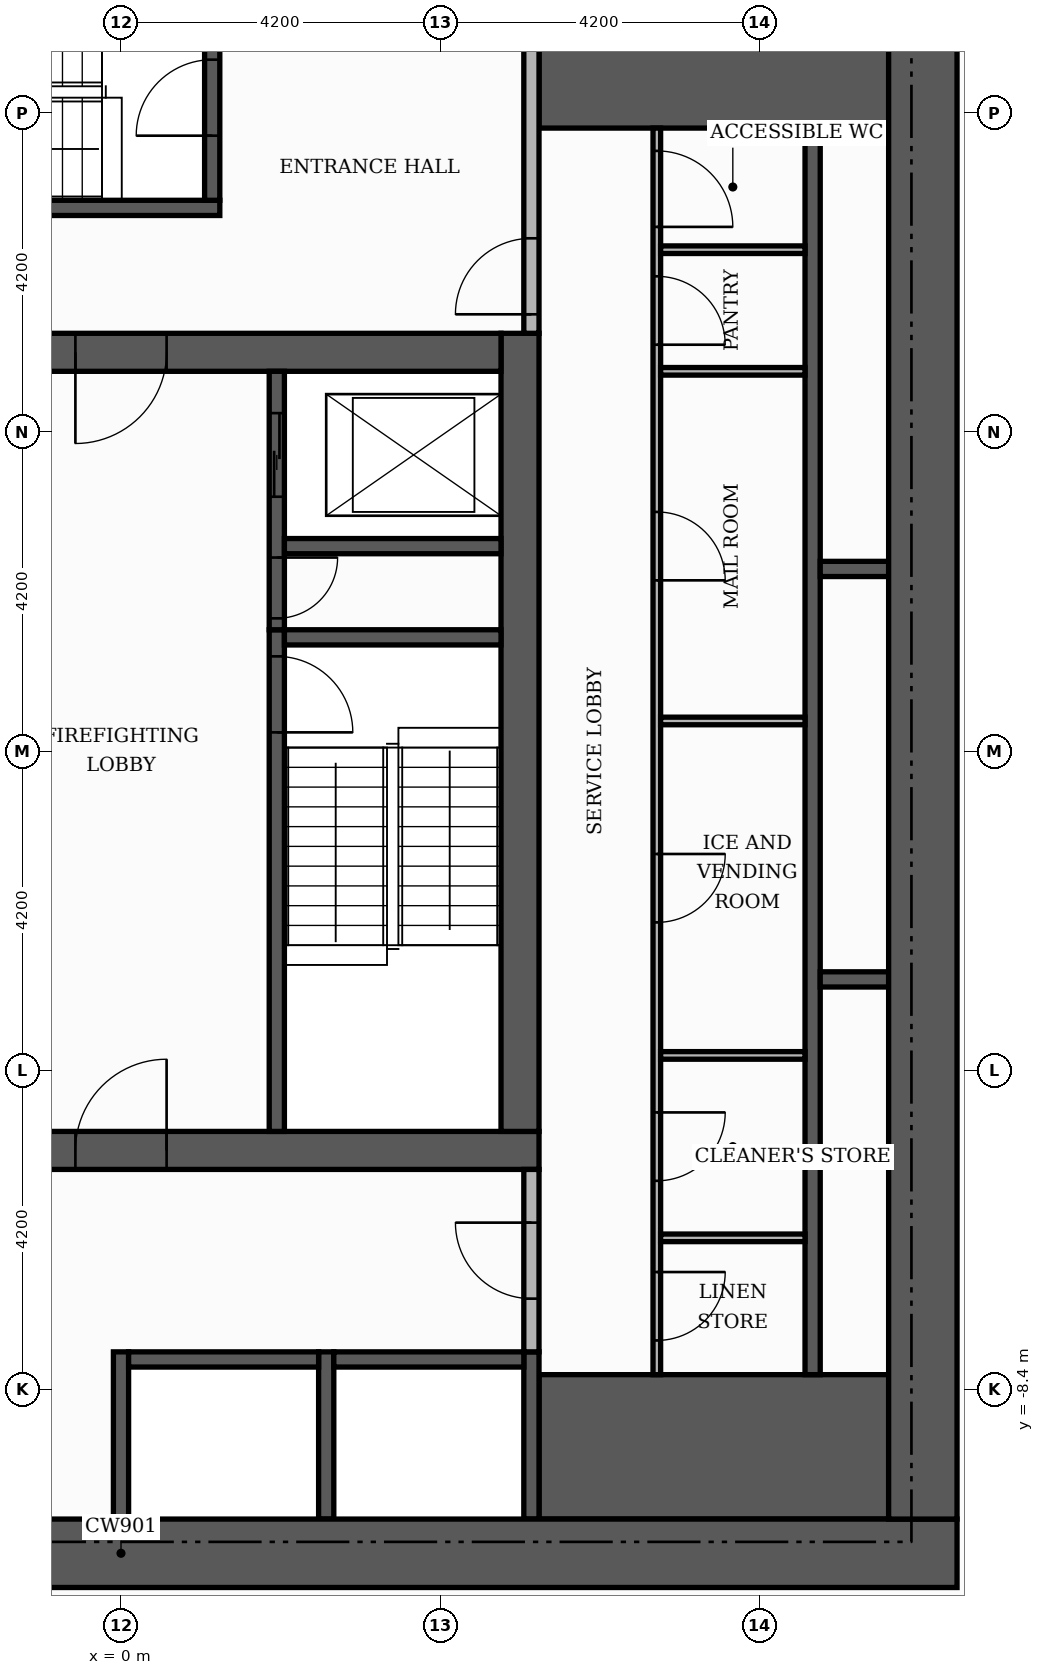
"""IFC4 building model, lengths in metres.
Left out: names, types, materials, properties, quantities, classifications, styles, units other than length and angle.
Written with IfcOpenShell. Run it as: python <this file> out.ifc"""

import sys

from ifc_helpers import new_model, si_unit, direction, frame, frame_2d, origin, place, context, subcontext, project, spatial, rectangle, extrude, element, fill, save


model = new_model("IFC4")
c1 = context("Model", 3, precision=1e-05, world=origin(), true_north=direction((0.0, 1.0)))
c2 = subcontext(c1, "Body", "Model", "MODEL_VIEW")
j1 = project(units=[si_unit("LENGTHUNIT", "METRE"), si_unit("PLANEANGLEUNIT", "RADIAN")], contexts=[c1])
p1 = place(None, origin())
s1 = spatial("IfcSite", under=j1, at=p1, CompositionType="ELEMENT")
p2 = place(p1, origin())
s2 = spatial("IfcBuilding", under=s1, at=p2, CompositionType="ELEMENT")
p3 = place(p2, frame((0.0, 0.0, 54.3)))
s3 = spatial("IfcBuildingStorey", under=s2, at=p3, CompositionType="ELEMENT", Elevation=54.3)
p4 = place(p3, frame((-5.5, -5.25, 0.0), z_axis=(0.0, 0.0, 1.0), x_axis=(1.0, 0.0, 0.0)))
e1 = element("IfcWall", 1, at=p4, inside=s3, PredefinedType="SHEAR", context=c2, shape_type="SweptSolid", body=[
    extrude(rectangle(XDim=11.0, YDim=0.5, at=frame_2d((5.5, 0.0))), origin(), (0.0, 0.0, 1.0), 3.48),
])
p5 = place(p4, frame((4.9, 0.0, 0.0)))
e2 = element("IfcOpeningElement", 2, at=p5, cuts=e1, PredefinedType="OPENING", context=c2, shape_type="SweptSolid", body=[
    extrude(rectangle(XDim=1.2, YDim=2.1, at=frame_2d((0.6, 1.05))), frame((0.0, 0.26, 0.0), z_axis=(0.0, -1.0, 0.0), x_axis=(1.0, 0.0, 0.0)), (0.0, 0.0, 1.0), 0.52),
])
p6 = place(p3, frame((5.25, -5.0, 0.0), z_axis=(0.0, 0.0, 1.0), x_axis=(0.0, 1.0, 0.0)))
e3 = element("IfcWall", 3, at=p6, inside=s3, PredefinedType="SHEAR", context=c2, shape_type="SweptSolid", body=[
    extrude(rectangle(XDim=10.5, YDim=0.5, at=frame_2d((5.25, 0.0))), origin(), (0.0, 0.0, 1.0), 3.48),
])
p7 = place(p3, frame((-5.0, 5.25, 0.0), z_axis=(0.0, 0.0, 1.0), x_axis=(1.0, 0.0, 0.0)))
e4 = element("IfcWall", 4, at=p7, inside=s3, PredefinedType="SHEAR", context=c2, shape_type="SweptSolid", body=[
    extrude(rectangle(XDim=10.0, YDim=0.5, at=frame_2d((5.0, 0.0))), origin(), (0.0, 0.0, 1.0), 3.48),
])
p8 = place(p7, frame((4.4, 0.0, 0.0)))
e5 = element("IfcOpeningElement", 5, at=p8, cuts=e4, PredefinedType="OPENING", context=c2, shape_type="SweptSolid", body=[
    extrude(rectangle(XDim=1.2, YDim=2.1, at=frame_2d((0.6, 1.05))), frame((0.0, 0.26, 0.0), z_axis=(0.0, -1.0, 0.0), x_axis=(1.0, 0.0, 0.0)), (0.0, 0.0, 1.0), 0.52),
])
for number, where, z_axis, x_axis in (
    (6, (5.5, -9.15, 0.0), (0.0, 0.0, 1.0), (1.0, 0.0, 0.0)),
    (7, (5.5, 9.15, 0.0), (0.0, 0.0, 1.0), (1.0, 0.0, 0.0)),
):
    element("IfcWall", number, at=place(p3, frame(where, z_axis=z_axis, x_axis=x_axis)), inside=s3, PredefinedType="SHEAR", context=c2, shape_type="SweptSolid", body=[
        extrude(rectangle(XDim=4.6, YDim=1.9, at=frame_2d((2.3, 0.0))), origin(), (0.0, 0.0, 1.0), 3.48),
    ])
p9 = place(p3, frame((2.05, -5.0, 0.0), z_axis=(0.0, 0.0, 1.0), x_axis=(0.0, 1.0, 0.0)))
e8 = element("IfcWall", 8, at=p9, inside=s3, PredefinedType="SHEAR", context=c2, shape_type="SweptSolid", body=[
    extrude(rectangle(XDim=6.6, YDim=0.2, at=frame_2d((3.3, 0.0))), origin(), (0.0, 0.0, 1.0), 3.48),
])
p10 = place(p9, frame((5.25, 0.0, 0.0)))
e9 = element("IfcOpeningElement", 9, at=p10, cuts=e8, PredefinedType="OPENING", context=c2, shape_type="SweptSolid", body=[
    extrude(rectangle(XDim=1.0, YDim=2.1, at=frame_2d((0.5, 1.05))), frame((0.0, 0.11, 0.0), z_axis=(0.0, -1.0, 0.0), x_axis=(1.0, 0.0, 0.0)), (0.0, 0.0, 1.0), 0.22),
])
p11 = place(p3, frame((2.15, 1.5, 0.0), z_axis=(0.0, 0.0, 1.0), x_axis=(1.0, 0.0, 0.0)))
e10 = element("IfcWall", 10, at=p11, inside=s3, PredefinedType="SHEAR", context=c2, shape_type="SweptSolid", body=[
    extrude(rectangle(XDim=2.85, YDim=0.2, at=frame_2d((1.425, 0.0))), origin(), (0.0, 0.0, 1.0), 3.48),
])
p12 = place(p3, frame((-5.5, 7.15, 0.0), z_axis=(0.0, 0.0, 1.0), x_axis=(1.0, 0.0, 0.0)))
e11 = element("IfcWall", 11, at=p12, inside=s3, PredefinedType="SHEAR", context=c2, shape_type="SweptSolid", body=[
    extrude(rectangle(XDim=6.8, YDim=0.2, at=frame_2d((3.4, 0.0))), origin(), (0.0, 0.0, 1.0), 3.48),
])
p13 = place(p3, frame((1.2, 7.25, 0.0), z_axis=(0.0, 0.0, 1.0), x_axis=(0.0, 1.0, 0.0)))
e12 = element("IfcWall", 12, at=p13, inside=s3, PredefinedType="SHEAR", context=c2, shape_type="SweptSolid", body=[
    extrude(rectangle(XDim=2.85, YDim=0.2, at=frame_2d((1.425, 0.0))), origin(), (0.0, 0.0, 1.0), 3.48),
])
p14 = place(p13, frame((0.85, 0.0, 0.0)))
e13 = element("IfcOpeningElement", 13, at=p14, cuts=e12, PredefinedType="OPENING", context=c2, shape_type="SweptSolid", body=[
    extrude(rectangle(XDim=1.0, YDim=2.1, at=frame_2d((0.5, 1.05))), frame((0.0, 0.11, 0.0), z_axis=(0.0, -1.0, 0.0), x_axis=(1.0, 0.0, 0.0)), (0.0, 0.0, 1.0), 0.22),
])
for number, where, z_axis, x_axis in (
    (14, (0.0, -10.1, 0.0), (0.0, 0.0, 1.0), (0.0, 1.0, 0.0)),
    (15, (2.7, -10.1, 0.0), (0.0, 0.0, 1.0), (0.0, 1.0, 0.0)),
    (16, (5.4, -10.1, 0.0), (0.0, 0.0, 1.0), (0.0, 1.0, 0.0)),
):
    element("IfcWall", number, at=place(p3, frame(where, z_axis=z_axis, x_axis=x_axis)), inside=s3, PredefinedType="SHEAR", context=c2, shape_type="SweptSolid", body=[
        extrude(rectangle(XDim=2.2, YDim=0.2, at=frame_2d((1.1, 0.0))), origin(), (0.0, 0.0, 1.0), 3.48),
    ])
p15 = place(p3, frame((9.1, -8.2, 0.0), z_axis=(0.0, 0.0, 1.0), x_axis=(0.0, 1.0, 0.0)))
e17 = element("IfcWall", 17, at=p15, inside=s3, PredefinedType="SHEAR", context=c2, shape_type="SweptSolid", body=[
    extrude(rectangle(XDim=16.4, YDim=0.2, at=frame_2d((8.2, 0.0))), origin(), (0.0, 0.0, 1.0), 3.48),
])
for number, where, z_axis, x_axis in (
    (18, (0.1, -8.0, 0.0), (0.0, 0.0, 1.0), (1.0, 0.0, 0.0)),
    (19, (2.8, -8.0, 0.0), (0.0, 0.0, 1.0), (1.0, 0.0, 0.0)),
):
    element("IfcWall", number, at=place(p3, frame(where, z_axis=z_axis, x_axis=x_axis)), inside=s3, PredefinedType="SHEAR", context=c2, shape_type="SweptSolid", body=[
        extrude(rectangle(XDim=2.5, YDim=0.2, at=frame_2d((1.25, 0.0))), origin(), (0.0, 0.0, 1.0), 3.48),
    ])
p16 = place(p3, frame((9.2, -3.0, 0.0), z_axis=(0.0, 0.0, 1.0), x_axis=(1.0, 0.0, 0.0)))
e20 = element("IfcWall", 20, at=p16, inside=s3, PredefinedType="SHEAR", context=c2, shape_type="SweptSolid", body=[
    extrude(rectangle(XDim=0.9, YDim=0.2, at=frame_2d((0.45, 0.0))), origin(), (0.0, 0.0, 1.0), 3.48),
])
p17 = place(p3, frame((2.05, 1.6, 0.0), z_axis=(0.0, 0.0, 1.0), x_axis=(0.0, 1.0, 0.0)))
e21 = element("IfcWall", 21, at=p17, inside=s3, PredefinedType="SHEAR", context=c2, shape_type="SweptSolid", body=[
    extrude(rectangle(XDim=3.4, YDim=0.2, at=frame_2d((1.7, 0.0))), origin(), (0.0, 0.0, 1.0), 3.48),
])
p18 = place(p17, frame((1.75, 0.0, 0.0)))
e22 = element("IfcOpeningElement", 22, at=p18, cuts=e21, PredefinedType="OPENING", context=c2, shape_type="SweptSolid", body=[
    extrude(rectangle(XDim=1.1, YDim=2.1, at=frame_2d((0.55, 1.05))), frame((0.0, 0.11, 0.0), z_axis=(0.0, -1.0, 0.0), x_axis=(1.0, 0.0, 0.0)), (0.0, 0.0, 1.0), 0.22),
])
p19 = place(p17, frame((0.15, 0.0, 0.0)))
e23 = element("IfcOpeningElement", 23, at=p19, cuts=e21, PredefinedType="OPENING", context=c2, shape_type="SweptSolid", body=[
    extrude(rectangle(XDim=0.8, YDim=2.1, at=frame_2d((0.4, 1.05))), frame((0.0, 0.11, 0.0), z_axis=(0.0, -1.0, 0.0), x_axis=(1.0, 0.0, 0.0)), (0.0, 0.0, 1.0), 0.22),
])
p20 = place(p3, frame((9.2, 2.4, 0.0), z_axis=(0.0, 0.0, 1.0), x_axis=(1.0, 0.0, 0.0)))
e24 = element("IfcWall", 24, at=p20, inside=s3, PredefinedType="SHEAR", context=c2, shape_type="SweptSolid", body=[
    extrude(rectangle(XDim=0.9, YDim=0.2, at=frame_2d((0.45, 0.0))), origin(), (0.0, 0.0, 1.0), 3.48),
])
p21 = place(p3, frame((2.15, 2.7, 0.0), z_axis=(0.0, 0.0, 1.0), x_axis=(1.0, 0.0, 0.0)))
e25 = element("IfcWall", 25, at=p21, inside=s3, PredefinedType="SHEAR", context=c2, shape_type="SweptSolid", body=[
    extrude(rectangle(XDim=2.85, YDim=0.2, at=frame_2d((1.425, 0.0))), origin(), (0.0, 0.0, 1.0), 3.48),
])
p22 = place(p3, frame((-11.0, -10.55, 0.0), z_axis=(0.0, 0.0, 1.0), x_axis=(1.0, 0.0, 0.0)))
e26 = element("IfcWall", 26, at=p22, inside=s3, PredefinedType="SHEAR", context=c2, shape_type="SweptSolid", body=[
    extrude(rectangle(XDim=22.0, YDim=0.9, at=frame_2d((11.0, 0.0))), origin(), (0.0, 0.0, 1.0), 3.48),
])
p23 = place(p22, frame((7.4, 0.0, 0.0)))
e27 = element("IfcOpeningElement", 27, at=p23, cuts=e26, PredefinedType="OPENING", context=c2, shape_type="SweptSolid", body=[
    extrude(rectangle(XDim=1.8, YDim=2.2, at=frame_2d((0.9, 1.1))), frame((0.0, 0.46, 0.0), z_axis=(0.0, -1.0, 0.0), x_axis=(1.0, 0.0, 0.0)), (0.0, 0.0, 1.0), 0.92),
])
p24 = place(p3, frame((10.55, -10.1, 0.0), z_axis=(0.0, 0.0, 1.0), x_axis=(0.0, 1.0, 0.0)))
e28 = element("IfcWall", 28, at=p24, inside=s3, PredefinedType="SHEAR", context=c2, shape_type="SweptSolid", body=[
    extrude(rectangle(XDim=20.2, YDim=0.9, at=frame_2d((10.1, 0.0))), origin(), (0.0, 0.0, 1.0), 3.48),
])
p25 = place(p3, frame((7.05, -8.2, 0.0), z_axis=(0.0, 0.0, 1.0), x_axis=(0.0, 1.0, 0.0)))
e29 = element("IfcWall", 29, at=p25, inside=s3, PredefinedType="PARTITIONING", context=c2, shape_type="SweptSolid", body=[
    extrude(rectangle(XDim=16.4, YDim=0.1, at=frame_2d((8.2, 0.0))), origin(), (0.0, 0.0, 1.0), 3.48),
])
p26 = place(p25, frame((0.45, 0.0, 0.0)))
e30 = element("IfcOpeningElement", 30, at=p26, cuts=e29, PredefinedType="OPENING", context=c2, shape_type="SweptSolid", body=[
    extrude(rectangle(XDim=0.9, YDim=2.1, at=frame_2d((0.45, 1.05))), frame((0.0, 0.06, 0.0), z_axis=(0.0, -1.0, 0.0), x_axis=(1.0, 0.0, 0.0)), (0.0, 0.0, 1.0), 0.12),
])
p27 = place(p25, frame((2.55, 0.0, 0.0)))
e31 = element("IfcOpeningElement", 31, at=p27, cuts=e29, PredefinedType="OPENING", context=c2, shape_type="SweptSolid", body=[
    extrude(rectangle(XDim=0.9, YDim=2.1, at=frame_2d((0.45, 1.05))), frame((0.0, 0.06, 0.0), z_axis=(0.0, -1.0, 0.0), x_axis=(1.0, 0.0, 0.0)), (0.0, 0.0, 1.0), 0.12),
])
p28 = place(p25, frame((5.95, 0.0, 0.0)))
e32 = element("IfcOpeningElement", 32, at=p28, cuts=e29, PredefinedType="OPENING", context=c2, shape_type="SweptSolid", body=[
    extrude(rectangle(XDim=0.9, YDim=2.1, at=frame_2d((0.45, 1.05))), frame((0.0, 0.06, 0.0), z_axis=(0.0, -1.0, 0.0), x_axis=(1.0, 0.0, 0.0)), (0.0, 0.0, 1.0), 0.12),
])
p29 = place(p25, frame((10.45, 0.0, 0.0)))
e33 = element("IfcOpeningElement", 33, at=p29, cuts=e29, PredefinedType="OPENING", context=c2, shape_type="SweptSolid", body=[
    extrude(rectangle(XDim=0.9, YDim=2.1, at=frame_2d((0.45, 1.05))), frame((0.0, 0.06, 0.0), z_axis=(0.0, -1.0, 0.0), x_axis=(1.0, 0.0, 0.0)), (0.0, 0.0, 1.0), 0.12),
])
p30 = place(p25, frame((13.55, 0.0, 0.0)))
e34 = element("IfcOpeningElement", 34, at=p30, cuts=e29, PredefinedType="OPENING", context=c2, shape_type="SweptSolid", body=[
    extrude(rectangle(XDim=0.9, YDim=2.1, at=frame_2d((0.45, 1.05))), frame((0.0, 0.06, 0.0), z_axis=(0.0, -1.0, 0.0), x_axis=(1.0, 0.0, 0.0)), (0.0, 0.0, 1.0), 0.12),
])
p31 = place(p25, frame((15.1, 0.0, 0.0)))
e35 = element("IfcOpeningElement", 35, at=p31, cuts=e29, PredefinedType="OPENING", context=c2, shape_type="SweptSolid", body=[
    extrude(rectangle(XDim=1.0, YDim=2.1, at=frame_2d((0.5, 1.05))), frame((0.0, 0.06, 0.0), z_axis=(0.0, -1.0, 0.0), x_axis=(1.0, 0.0, 0.0)), (0.0, 0.0, 1.0), 0.12),
])
p32 = place(p3, frame((5.4, -7.9, 0.0), z_axis=(0.0, 0.0, 1.0), x_axis=(0.0, 1.0, 0.0)))
e36 = element("IfcWall", 36, at=p32, inside=s3, PredefinedType="PARTITIONING", context=c2, shape_type="SweptSolid", body=[
    extrude(rectangle(XDim=2.4, YDim=0.2, at=frame_2d((1.2, 0.0))), origin(), (0.0, 0.0, 1.0), 3.48),
])
p33 = place(p32, frame((0.7, 0.0, 0.0)))
e37 = element("IfcOpeningElement", 37, at=p33, cuts=e36, PredefinedType="OPENING", context=c2, shape_type="SweptSolid", body=[
    extrude(rectangle(XDim=1.0, YDim=2.1, at=frame_2d((0.5, 1.05))), frame((0.0, 0.11, 0.0), z_axis=(0.0, -1.0, 0.0), x_axis=(1.0, 0.0, 0.0)), (0.0, 0.0, 1.0), 0.22),
])
for number, where, z_axis, x_axis in (
    (38, (7.1, -6.4, 0.0), (0.0, 0.0, 1.0), (1.0, 0.0, 0.0)),
    (39, (7.1, -4.0, 0.0), (0.0, 0.0, 1.0), (1.0, 0.0, 0.0)),
    (40, (7.1, 0.4, 0.0), (0.0, 0.0, 1.0), (1.0, 0.0, 0.0)),
    (41, (7.1, 5.0, 0.0), (0.0, 0.0, 1.0), (1.0, 0.0, 0.0)),
):
    element("IfcWall", number, at=place(p3, frame(where, z_axis=z_axis, x_axis=x_axis)), inside=s3, PredefinedType="PARTITIONING", context=c2, shape_type="SweptSolid", body=[
        extrude(rectangle(XDim=1.9, YDim=0.1, at=frame_2d((0.95, 0.0))), origin(), (0.0, 0.0, 1.0), 3.48),
    ])
p34 = place(p3, frame((5.4, 5.5, 0.0), z_axis=(0.0, 0.0, 1.0), x_axis=(0.0, 1.0, 0.0)))
e42 = element("IfcWall", 42, at=p34, inside=s3, PredefinedType="PARTITIONING", context=c2, shape_type="SweptSolid", body=[
    extrude(rectangle(XDim=4.6, YDim=0.2, at=frame_2d((2.3, 0.0))), origin(), (0.0, 0.0, 1.0), 3.48),
])
p35 = place(p34, frame((0.25, 0.0, 0.0)))
e43 = element("IfcOpeningElement", 43, at=p35, cuts=e42, PredefinedType="OPENING", context=c2, shape_type="SweptSolid", body=[
    extrude(rectangle(XDim=1.0, YDim=2.1, at=frame_2d((0.5, 1.05))), frame((0.0, 0.11, 0.0), z_axis=(0.0, -1.0, 0.0), x_axis=(1.0, 0.0, 0.0)), (0.0, 0.0, 1.0), 0.22),
])
p36 = place(p3, frame((7.1, 6.6, 0.0), z_axis=(0.0, 0.0, 1.0), x_axis=(1.0, 0.0, 0.0)))
e44 = element("IfcWall", 44, at=p36, inside=s3, PredefinedType="PARTITIONING", context=c2, shape_type="SweptSolid", body=[
    extrude(rectangle(XDim=1.9, YDim=0.1, at=frame_2d((0.95, 0.0))), origin(), (0.0, 0.0, 1.0), 3.48),
])
p37 = place(p18, origin())
e45 = element("IfcDoor", 45, at=p37, inside=s3, OperationType="SLIDING_TO_LEFT", PredefinedType="DOOR", context=c2, shape_type="SweptSolid", body=[
    extrude(rectangle(XDim=1.1, YDim=2.1, at=frame_2d((0.55, 1.05))), frame((0.0, 0.025, 0.0), z_axis=(0.0, -1.0, 0.0), x_axis=(1.0, 0.0, 0.0)), (0.0, 0.0, 1.0), 0.05),
])
fill(e22, e45)
p38 = place(p10, frame((1.0, 0.0, 0.0), z_axis=(0.0, 0.0, 1.0), x_axis=(-1.0, 0.0, 0.0)))
e46 = element("IfcDoor", 46, at=p38, inside=s3, OperationType="SINGLE_SWING_LEFT", PredefinedType="DOOR", context=c2, shape_type="SweptSolid", body=[
    extrude(rectangle(XDim=1.0, YDim=2.1, at=frame_2d((0.5, 1.05))), frame((0.0, 0.025, 0.0), z_axis=(0.0, -1.0, 0.0), x_axis=(1.0, 0.0, 0.0)), (0.0, 0.0, 1.0), 0.05),
])
fill(e9, e46)
p39 = place(p19, frame((0.8, 0.0, 0.0), z_axis=(0.0, 0.0, 1.0), x_axis=(-1.0, 0.0, 0.0)))
e47 = element("IfcDoor", 47, at=p39, inside=s3, OperationType="SINGLE_SWING_RIGHT", PredefinedType="DOOR", context=c2, shape_type="SweptSolid", body=[
    extrude(rectangle(XDim=0.8, YDim=2.1, at=frame_2d((0.4, 1.05))), frame((0.0, 0.025, 0.0), z_axis=(0.0, -1.0, 0.0), x_axis=(1.0, 0.0, 0.0)), (0.0, 0.0, 1.0), 0.05),
])
fill(e23, e47)
p40 = place(p8, frame((1.2, 0.0, 0.0), z_axis=(0.0, 0.0, 1.0), x_axis=(-1.0, 0.0, 0.0)))
e48 = element("IfcDoor", 48, at=p40, inside=s3, OperationType="SINGLE_SWING_LEFT", PredefinedType="DOOR", context=c2, shape_type="SweptSolid", body=[
    extrude(rectangle(XDim=1.2, YDim=2.1, at=frame_2d((0.6, 1.05))), frame((0.0, 0.025, 0.0), z_axis=(0.0, -1.0, 0.0), x_axis=(1.0, 0.0, 0.0)), (0.0, 0.0, 1.0), 0.05),
])
fill(e5, e48)
p41 = place(p5, origin())
e49 = element("IfcDoor", 49, at=p41, inside=s3, OperationType="SINGLE_SWING_RIGHT", PredefinedType="DOOR", context=c2, shape_type="SweptSolid", body=[
    extrude(rectangle(XDim=1.2, YDim=2.1, at=frame_2d((0.6, 1.05))), frame((0.0, 0.025, 0.0), z_axis=(0.0, -1.0, 0.0), x_axis=(1.0, 0.0, 0.0)), (0.0, 0.0, 1.0), 0.05),
])
fill(e2, e49)
p42 = place(p14, origin())
e50 = element("IfcDoor", 50, at=p42, inside=s3, OperationType="SINGLE_SWING_LEFT", PredefinedType="DOOR", context=c2, shape_type="SweptSolid", body=[
    extrude(rectangle(XDim=1.0, YDim=2.1, at=frame_2d((0.5, 1.05))), frame((0.0, 0.025, 0.0), z_axis=(0.0, -1.0, 0.0), x_axis=(1.0, 0.0, 0.0)), (0.0, 0.0, 1.0), 0.05),
])
fill(e13, e50)
p43 = place(p35, origin())
e51 = element("IfcDoor", 51, at=p43, inside=s3, OperationType="SINGLE_SWING_LEFT", PredefinedType="DOOR", context=c2, shape_type="SweptSolid", body=[
    extrude(rectangle(XDim=1.0, YDim=2.1, at=frame_2d((0.5, 1.05))), frame((0.0, 0.025, 0.0), z_axis=(0.0, -1.0, 0.0), x_axis=(1.0, 0.0, 0.0)), (0.0, 0.0, 1.0), 0.05),
])
fill(e43, e51)
p44 = place(p33, origin())
e52 = element("IfcDoor", 52, at=p44, inside=s3, OperationType="SINGLE_SWING_RIGHT", PredefinedType="DOOR", context=c2, shape_type="SweptSolid", body=[
    extrude(rectangle(XDim=1.0, YDim=2.1, at=frame_2d((0.5, 1.05))), frame((0.0, 0.025, 0.0), z_axis=(0.0, -1.0, 0.0), x_axis=(1.0, 0.0, 0.0)), (0.0, 0.0, 1.0), 0.05),
])
fill(e37, e52)
p45 = place(p26, frame((0.9, 0.0, 0.0), z_axis=(0.0, 0.0, 1.0), x_axis=(-1.0, 0.0, 0.0)))
e53 = element("IfcDoor", 53, at=p45, inside=s3, OperationType="SINGLE_SWING_RIGHT", PredefinedType="DOOR", context=c2, shape_type="SweptSolid", body=[
    extrude(rectangle(XDim=0.9, YDim=2.1, at=frame_2d((0.45, 1.05))), frame((0.0, 0.025, 0.0), z_axis=(0.0, -1.0, 0.0), x_axis=(1.0, 0.0, 0.0)), (0.0, 0.0, 1.0), 0.05),
])
fill(e30, e53)
p46 = place(p27, frame((0.9, 0.0, 0.0), z_axis=(0.0, 0.0, 1.0), x_axis=(-1.0, 0.0, 0.0)))
e54 = element("IfcDoor", 54, at=p46, inside=s3, OperationType="SINGLE_SWING_RIGHT", PredefinedType="DOOR", context=c2, shape_type="SweptSolid", body=[
    extrude(rectangle(XDim=0.9, YDim=2.1, at=frame_2d((0.45, 1.05))), frame((0.0, 0.025, 0.0), z_axis=(0.0, -1.0, 0.0), x_axis=(1.0, 0.0, 0.0)), (0.0, 0.0, 1.0), 0.05),
])
fill(e31, e54)
p47 = place(p28, frame((0.9, 0.0, 0.0), z_axis=(0.0, 0.0, 1.0), x_axis=(-1.0, 0.0, 0.0)))
e55 = element("IfcDoor", 55, at=p47, inside=s3, OperationType="SINGLE_SWING_RIGHT", PredefinedType="DOOR", context=c2, shape_type="SweptSolid", body=[
    extrude(rectangle(XDim=0.9, YDim=2.1, at=frame_2d((0.45, 1.05))), frame((0.0, 0.025, 0.0), z_axis=(0.0, -1.0, 0.0), x_axis=(1.0, 0.0, 0.0)), (0.0, 0.0, 1.0), 0.05),
])
fill(e32, e55)
p48 = place(p29, frame((0.9, 0.0, 0.0), z_axis=(0.0, 0.0, 1.0), x_axis=(-1.0, 0.0, 0.0)))
e56 = element("IfcDoor", 56, at=p48, inside=s3, OperationType="SINGLE_SWING_LEFT", PredefinedType="DOOR", context=c2, shape_type="SweptSolid", body=[
    extrude(rectangle(XDim=0.9, YDim=2.1, at=frame_2d((0.45, 1.05))), frame((0.0, 0.025, 0.0), z_axis=(0.0, -1.0, 0.0), x_axis=(1.0, 0.0, 0.0)), (0.0, 0.0, 1.0), 0.05),
])
fill(e33, e56)
p49 = place(p30, frame((0.9, 0.0, 0.0), z_axis=(0.0, 0.0, 1.0), x_axis=(-1.0, 0.0, 0.0)))
e57 = element("IfcDoor", 57, at=p49, inside=s3, OperationType="SINGLE_SWING_LEFT", PredefinedType="DOOR", context=c2, shape_type="SweptSolid", body=[
    extrude(rectangle(XDim=0.9, YDim=2.1, at=frame_2d((0.45, 1.05))), frame((0.0, 0.025, 0.0), z_axis=(0.0, -1.0, 0.0), x_axis=(1.0, 0.0, 0.0)), (0.0, 0.0, 1.0), 0.05),
])
fill(e34, e57)
p50 = place(p31, frame((1.0, 0.0, 0.0), z_axis=(0.0, 0.0, 1.0), x_axis=(-1.0, 0.0, 0.0)))
e58 = element("IfcDoor", 58, at=p50, inside=s3, OperationType="SINGLE_SWING_LEFT", PredefinedType="DOOR", context=c2, shape_type="SweptSolid", body=[
    extrude(rectangle(XDim=1.0, YDim=2.1, at=frame_2d((0.5, 1.05))), frame((0.0, 0.025, 0.0), z_axis=(0.0, -1.0, 0.0), x_axis=(1.0, 0.0, 0.0)), (0.0, 0.0, 1.0), 0.05),
])
fill(e35, e58)
save(model, sys.argv[1])
